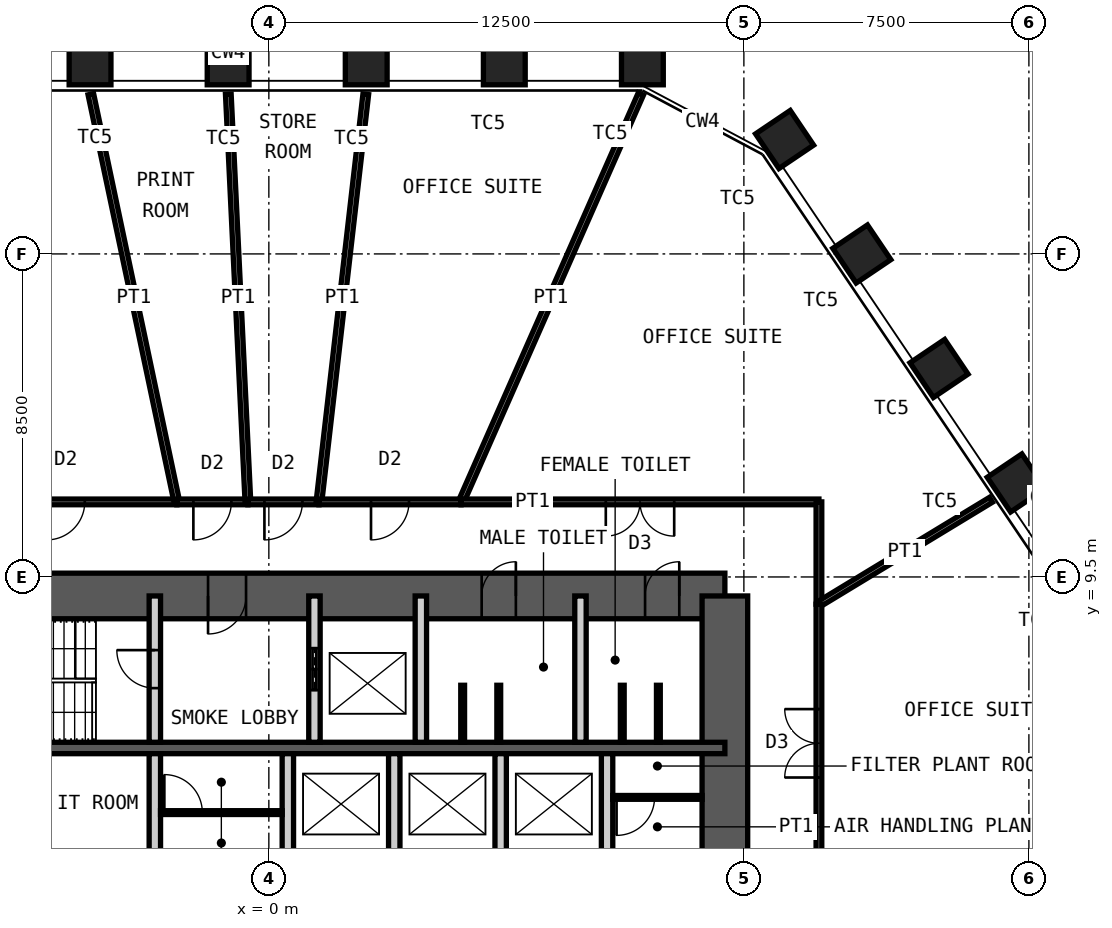
"""IFC4 building model, lengths in metres.
Left out: names, types, materials, properties, quantities, classifications, styles, units other than length and angle.
Written with IfcOpenShell. Run it as: python <this file> out.ifc"""

import sys

from ifc_helpers import new_model, si_unit, direction, frame, frame_2d, origin, origin_2d, place, context, subcontext, project, spatial, rectangle, hollow_rectangle, extrude, element, fill, save


model = new_model("IFC4")
c1 = context("Model", 3, precision=1e-05, world=origin(), true_north=direction((0.0, 1.0)))
c2 = subcontext(c1, "Body", "Model", "MODEL_VIEW")
j1 = project(units=[si_unit("LENGTHUNIT", "METRE"), si_unit("PLANEANGLEUNIT", "RADIAN")], contexts=[c1])
p1 = place(None, origin())
s1 = spatial("IfcSite", under=j1, at=p1, CompositionType="ELEMENT")
p2 = place(p1, origin())
s2 = spatial("IfcBuilding", under=s1, at=p2, CompositionType="ELEMENT")
p3 = place(p2, frame((0.0, 0.0, 201.4)))
s3 = spatial("IfcBuildingStorey", under=s2, at=p3, CompositionType="ELEMENT", Elevation=201.4)
for number, where, z_axis, x_axis in (
    (1, (-4.705, 23.0, 0.0), (0.0, 0.0, 1.0), (-1.0, 0.0, 0.0)),
    (2, (-1.071, 23.0, 0.0), (0.0, 0.0, 1.0), (-1.0, 0.0, 0.0)),
    (3, (2.562, 23.0, 0.0), (0.0, 0.0, 1.0), (-1.0, 0.0, 0.0)),
    (4, (6.196, 23.0, 0.0), (0.0, 0.0, 1.0), (-1.0, 0.0, 0.0)),
    (5, (9.829, 23.0, 0.0), (0.0, 0.0, 1.0), (-1.0, 0.0, 0.0)),
    (6, (13.571, 21.01, 0.0), (0.0, 0.0, 1.0), (-0.559, 0.829, 0.0)),
    (7, (15.603, 17.998, 0.0), (0.0, 0.0, 1.0), (-0.559, 0.829, 0.0)),
    (8, (17.635, 14.986, 0.0), (0.0, 0.0, 1.0), (-0.559, 0.829, 0.0)),
    (9, (19.667, 11.973, 0.0), (0.0, 0.0, 1.0), (-0.559, 0.829, 0.0)),
):
    element("IfcColumn", number, at=place(p3, frame(where, z_axis=z_axis, x_axis=x_axis)), inside=s3, PredefinedType="COLUMN", context=c2, shape_type="SweptSolid", body=[
        extrude(hollow_rectangle(XDim=1.1, YDim=1.1, WallThickness=0.07, at=origin_2d()), origin(), (0.0, 0.0, 1.0), 4.2),
    ])
p4 = place(p3, frame((-12.0, 9.0, 0.0), z_axis=(0.0, 0.0, 1.0), x_axis=(1.0, 0.0, 0.0)))
e10 = element("IfcWall", 10, at=p4, inside=s3, PredefinedType="SHEAR", context=c2, shape_type="SweptSolid", body=[
    extrude(rectangle(XDim=24.0, YDim=1.2, at=frame_2d((12.0, 0.0))), origin(), (0.0, 0.0, 1.0), 4.2),
])
p5 = place(p4, frame((10.4, 0.0, 0.0)))
e11 = element("IfcOpeningElement", 11, at=p5, cuts=e10, PredefinedType="OPENING", context=c2, shape_type="SweptSolid", body=[
    extrude(rectangle(XDim=1.0, YDim=2.1, at=frame_2d((0.5, 1.05))), frame((0.0, 0.61, 0.0), z_axis=(0.0, -1.0, 0.0), x_axis=(1.0, 0.0, 0.0)), (0.0, 0.0, 1.0), 1.22),
])
p6 = place(p4, frame((17.6, 0.0, 0.0)))
e12 = element("IfcOpeningElement", 12, at=p6, cuts=e10, PredefinedType="OPENING", context=c2, shape_type="SweptSolid", body=[
    extrude(rectangle(XDim=0.9, YDim=2.1, at=frame_2d((0.45, 1.05))), frame((0.0, 0.61, 0.0), z_axis=(0.0, -1.0, 0.0), x_axis=(1.0, 0.0, 0.0)), (0.0, 0.0, 1.0), 1.22),
])
p7 = place(p4, frame((21.9, 0.0, 0.0)))
e13 = element("IfcOpeningElement", 13, at=p7, cuts=e10, PredefinedType="OPENING", context=c2, shape_type="SweptSolid", body=[
    extrude(rectangle(XDim=0.9, YDim=2.1, at=frame_2d((0.45, 1.05))), frame((0.0, 0.61, 0.0), z_axis=(0.0, -1.0, 0.0), x_axis=(1.0, 0.0, 0.0)), (0.0, 0.0, 1.0), 1.22),
])
p8 = place(p3, frame((12.0, -9.0, 0.0), z_axis=(0.0, 0.0, 1.0), x_axis=(0.0, 1.0, 0.0)))
e14 = element("IfcWall", 14, at=p8, inside=s3, PredefinedType="SHEAR", context=c2, shape_type="SweptSolid", body=[
    extrude(rectangle(XDim=18.0, YDim=1.2, at=frame_2d((9.0, 0.0))), origin(), (0.0, 0.0, 1.0), 4.2),
])
p9 = place(p8, frame((8.1, 0.0, 0.0)))
e15 = element("IfcOpeningElement", 15, at=p9, cuts=e14, PredefinedType="OPENING", context=c2, shape_type="SweptSolid", body=[
    extrude(rectangle(XDim=1.8, YDim=2.1, at=frame_2d((0.9, 1.05))), frame((0.0, 0.61, 0.0), z_axis=(0.0, -1.0, 0.0), x_axis=(1.0, 0.0, 0.0)), (0.0, 0.0, 1.0), 1.22),
])
p10 = place(p3, frame((-12.0, 5.0, 0.0), z_axis=(0.0, 0.0, 1.0), x_axis=(1.0, 0.0, 0.0)))
e16 = element("IfcWall", 16, at=p10, inside=s3, PredefinedType="SHEAR", context=c2, shape_type="SweptSolid", body=[
    extrude(rectangle(XDim=24.0, YDim=0.3, at=frame_2d((12.0, 0.0))), origin(), (0.0, 0.0, 1.0), 4.2),
])
p11 = place(p3, frame((-3.0, 5.15, 0.0), z_axis=(0.0, 0.0, 1.0), x_axis=(0.0, 1.0, 0.0)))
e17 = element("IfcWall", 17, at=p11, inside=s3, PredefinedType="PARTITIONING", context=c2, shape_type="SweptSolid", body=[
    extrude(rectangle(XDim=3.85, YDim=0.3, at=frame_2d((1.925, 0.0))), origin(), (0.0, 0.0, 1.0), 3.98),
])
p12 = place(p11, frame((1.425, 0.0, 0.0)))
e18 = element("IfcOpeningElement", 18, at=p12, cuts=e17, PredefinedType="OPENING", context=c2, shape_type="SweptSolid", body=[
    extrude(rectangle(XDim=1.0, YDim=2.1, at=frame_2d((0.5, 1.05))), frame((0.0, 0.16, 0.0), z_axis=(0.0, -1.0, 0.0), x_axis=(1.0, 0.0, 0.0)), (0.0, 0.0, 1.0), 0.32),
])
p13 = place(p3, frame((1.2, 5.15, 0.0), z_axis=(0.0, 0.0, 1.0), x_axis=(0.0, 1.0, 0.0)))
e19 = element("IfcWall", 19, at=p13, inside=s3, PredefinedType="PARTITIONING", context=c2, shape_type="SweptSolid", body=[
    extrude(rectangle(XDim=3.85, YDim=0.3, at=frame_2d((1.925, 0.0))), origin(), (0.0, 0.0, 1.0), 3.98),
])
p14 = place(p13, frame((1.375, 0.0, 0.0)))
e20 = element("IfcOpeningElement", 20, at=p14, cuts=e19, PredefinedType="OPENING", context=c2, shape_type="SweptSolid", body=[
    extrude(rectangle(XDim=1.1, YDim=2.4, at=frame_2d((0.55, 1.2))), frame((0.0, 0.16, 0.0), z_axis=(0.0, -1.0, 0.0), x_axis=(1.0, 0.0, 0.0)), (0.0, 0.0, 1.0), 0.32),
])
for number, where, z_axis, x_axis in (
    (21, (4.0, 5.15, 0.0), (0.0, 0.0, 1.0), (0.0, 1.0, 0.0)),
    (22, (8.2, 5.15, 0.0), (0.0, 0.0, 1.0), (0.0, 1.0, 0.0)),
):
    element("IfcWall", number, at=place(p3, frame(where, z_axis=z_axis, x_axis=x_axis)), inside=s3, PredefinedType="PARTITIONING", context=c2, shape_type="SweptSolid", body=[
        extrude(rectangle(XDim=3.85, YDim=0.3, at=frame_2d((1.925, 0.0))), origin(), (0.0, 0.0, 1.0), 3.98),
    ])
for number, where, z_axis, x_axis in (
    (23, (-3.0, 2.2, 0.0), (0.0, 0.0, 1.0), (0.0, 1.0, 0.0)),
    (24, (0.5, 2.2, 0.0), (0.0, 0.0, 1.0), (0.0, 1.0, 0.0)),
    (25, (3.3, 2.2, 0.0), (0.0, 0.0, 1.0), (0.0, 1.0, 0.0)),
    (26, (6.1, 2.2, 0.0), (0.0, 0.0, 1.0), (0.0, 1.0, 0.0)),
    (27, (8.9, 2.2, 0.0), (0.0, 0.0, 1.0), (0.0, 1.0, 0.0)),
):
    element("IfcWall", number, at=place(p3, frame(where, z_axis=z_axis, x_axis=x_axis)), inside=s3, PredefinedType="PARTITIONING", context=c2, shape_type="SweptSolid", body=[
        extrude(rectangle(XDim=2.65, YDim=0.3, at=frame_2d((1.325, 0.0))), origin(), (0.0, 0.0, 1.0), 3.98),
    ])
p15 = place(p3, frame((-2.85, 3.3, 0.0), z_axis=(0.0, 0.0, 1.0), x_axis=(1.0, 0.0, 0.0)))
e28 = element("IfcWall", 28, at=p15, inside=s3, PredefinedType="PARTITIONING", context=c2, shape_type="SweptSolid", body=[
    extrude(rectangle(XDim=3.2, YDim=0.1, at=frame_2d((1.6, 0.0))), origin(), (0.0, 0.0, 1.0), 3.98),
])
p16 = place(p15, frame((0.1, 0.0, 0.0)))
e29 = element("IfcOpeningElement", 29, at=p16, cuts=e28, PredefinedType="OPENING", context=c2, shape_type="SweptSolid", body=[
    extrude(rectangle(XDim=1.0, YDim=2.4, at=frame_2d((0.5, 1.2))), frame((0.0, 0.06, 0.0), z_axis=(0.0, -1.0, 0.0), x_axis=(1.0, 0.0, 0.0)), (0.0, 0.0, 1.0), 0.12),
])
p17 = place(p3, frame((9.05, 3.7, 0.0), z_axis=(0.0, 0.0, 1.0), x_axis=(1.0, 0.0, 0.0)))
e30 = element("IfcWall", 30, at=p17, inside=s3, PredefinedType="PARTITIONING", context=c2, shape_type="SweptSolid", body=[
    extrude(rectangle(XDim=2.35, YDim=0.1, at=frame_2d((1.175, 0.0))), origin(), (0.0, 0.0, 1.0), 3.98),
])
p18 = place(p17, frame((0.1, 0.0, 0.0)))
e31 = element("IfcOpeningElement", 31, at=p18, cuts=e30, PredefinedType="OPENING", context=c2, shape_type="SweptSolid", body=[
    extrude(rectangle(XDim=1.0, YDim=2.4, at=frame_2d((0.5, 1.2))), frame((0.0, 0.06, 0.0), z_axis=(0.0, -1.0, 0.0), x_axis=(1.0, 0.0, 0.0)), (0.0, 0.0, 1.0), 0.12),
])
for number, where, z_axis, x_axis in (
    (32, (5.1, 5.15, 0.0), (0.0, 0.0, 1.0), (0.0, 1.0, 0.0)),
    (33, (6.05, 5.15, 0.0), (0.0, 0.0, 1.0), (0.0, 1.0, 0.0)),
    (34, (9.3, 5.15, 0.0), (0.0, 0.0, 1.0), (0.0, 1.0, 0.0)),
    (35, (10.25, 5.15, 0.0), (0.0, 0.0, 1.0), (0.0, 1.0, 0.0)),
):
    element("IfcWall", number, at=place(p3, frame(where, z_axis=z_axis, x_axis=x_axis)), inside=s3, PredefinedType="PARTITIONING", context=c2, shape_type="SweptSolid", body=[
        extrude(rectangle(XDim=1.5, YDim=0.1, at=frame_2d((0.75, 0.0))), origin(), (0.0, 0.0, 1.0), 2.1),
    ])
p19 = place(p3, frame((9.789, 22.208, 0.0), z_axis=(0.0, 0.0, 1.0), x_axis=(-0.403346052835, -0.9150475188, 0.0)))
e36 = element("IfcWall", 36, at=p19, inside=s3, PredefinedType="PARTITIONING", context=c2, shape_type="SweptSolid", body=[
    extrude(rectangle(XDim=11.73, YDim=0.15, at=frame_2d((5.865, 0.0))), origin(), (0.0, 0.0, 1.0), 2.93),
])
p20 = place(p3, frame((5.058, 11.475, 0.0), z_axis=(0.0, 0.0, 1.0), x_axis=(1.0, 0.0, 0.0)))
e37 = element("IfcWall", 37, at=p20, inside=s3, PredefinedType="PARTITIONING", context=c2, shape_type="SweptSolid", body=[
    extrude(rectangle(XDim=9.417, YDim=0.15, at=frame_2d((4.708, 0.0))), origin(), (0.0, 0.0, 1.0), 4.03),
])
p21 = place(p20, frame((3.809, 0.0, 0.0)))
e38 = element("IfcOpeningElement", 38, at=p21, cuts=e37, PredefinedType="OPENING", context=c2, shape_type="SweptSolid", body=[
    extrude(rectangle(XDim=1.8, YDim=2.4, at=frame_2d((0.9, 1.2))), frame((0.0, 0.085, 0.0), z_axis=(0.0, -1.0, 0.0), x_axis=(1.0, 0.0, 0.0)), (0.0, 0.0, 1.0), 0.17),
])
p22 = place(p3, frame((14.475, 11.475, 0.0), z_axis=(0.0, 0.0, 1.0), x_axis=(0.0, -1.0, 0.0)))
e39 = element("IfcWall", 39, at=p22, inside=s3, PredefinedType="PARTITIONING", context=c2, shape_type="SweptSolid", body=[
    extrude(rectangle(XDim=2.692, YDim=0.15, at=frame_2d((1.346, 0.0))), origin(), (0.0, 0.0, 1.0), 4.03),
])
p23 = place(p3, frame((19.001, 11.53, 0.0), z_axis=(0.0, 0.0, 1.0), x_axis=(-0.854906581035, -0.518781975114, 0.0)))
e40 = element("IfcWall", 40, at=p23, inside=s3, PredefinedType="PARTITIONING", context=c2, shape_type="SweptSolid", body=[
    extrude(rectangle(XDim=5.294, YDim=0.15, at=frame_2d((2.647, 0.0))), origin(), (0.0, 0.0, 1.0), 3.43),
])
p24 = place(p3, frame((14.475, 8.783, 0.0), z_axis=(0.0, 0.0, 1.0), x_axis=(0.0, -1.0, 0.0)))
e41 = element("IfcWall", 41, at=p24, inside=s3, PredefinedType="PARTITIONING", context=c2, shape_type="SweptSolid", body=[
    extrude(rectangle(XDim=7.321, YDim=0.15, at=frame_2d((3.66, 0.0))), origin(), (0.0, 0.0, 1.0), 4.03),
])
p25 = place(p24, frame((2.76, 0.0, 0.0)))
e42 = element("IfcOpeningElement", 42, at=p25, cuts=e41, PredefinedType="OPENING", context=c2, shape_type="SweptSolid", body=[
    extrude(rectangle(XDim=1.8, YDim=2.4, at=frame_2d((0.9, 1.2))), frame((0.0, 0.085, 0.0), z_axis=(0.0, -1.0, 0.0), x_axis=(1.0, 0.0, 0.0)), (0.0, 0.0, 1.0), 0.17),
])
p26 = place(p3, frame((25.083, 2.535, 0.0), z_axis=(0.0, 0.0, 1.0), x_axis=(-0.994932122767, -0.10054884925, 0.0)))
e43 = element("IfcWall", 43, at=p26, inside=s3, PredefinedType="PARTITIONING", context=c2, shape_type="SweptSolid", body=[
    extrude(rectangle(XDim=10.662, YDim=0.15, at=frame_2d((5.331, 0.0))), origin(), (0.0, 0.0, 1.0), 2.93),
])
p27 = place(p3, frame((-8.267, 11.475, 0.0), z_axis=(0.0, 0.0, 1.0), x_axis=(1.0, 0.0, 0.0)))
e44 = element("IfcWall", 44, at=p27, inside=s3, PredefinedType="PARTITIONING", context=c2, shape_type="SweptSolid", body=[
    extrude(rectangle(XDim=5.846, YDim=0.15, at=frame_2d((2.923, 0.0))), origin(), (0.0, 0.0, 1.0), 4.03),
])
p28 = place(p27, frame((2.423, 0.0, 0.0)))
e45 = element("IfcOpeningElement", 45, at=p28, cuts=e44, PredefinedType="OPENING", context=c2, shape_type="SweptSolid", body=[
    extrude(rectangle(XDim=1.0, YDim=2.4, at=frame_2d((0.5, 1.2))), frame((0.0, 0.085, 0.0), z_axis=(0.0, -1.0, 0.0), x_axis=(1.0, 0.0, 0.0)), (0.0, 0.0, 1.0), 0.17),
])
p29 = place(p3, frame((-4.684, 22.202, 0.0), z_axis=(0.0, 0.0, 1.0), x_axis=(0.206456017157, -0.978455881979, 0.0)))
e46 = element("IfcWall", 46, at=p29, inside=s3, PredefinedType="PARTITIONING", context=c2, shape_type="SweptSolid", body=[
    extrude(rectangle(XDim=10.963, YDim=0.15, at=frame_2d((5.481, 0.0))), origin(), (0.0, 0.0, 1.0), 3.43),
])
p30 = place(p3, frame((-2.421, 11.475, 0.0), z_axis=(0.0, 0.0, 1.0), x_axis=(1.0, 0.0, 0.0)))
e47 = element("IfcWall", 47, at=p30, inside=s3, PredefinedType="PARTITIONING", context=c2, shape_type="SweptSolid", body=[
    extrude(rectangle(XDim=1.87, YDim=0.15, at=frame_2d((0.935, 0.0))), origin(), (0.0, 0.0, 1.0), 4.03),
])
p31 = place(p30, frame((0.435, 0.0, 0.0)))
e48 = element("IfcOpeningElement", 48, at=p31, cuts=e47, PredefinedType="OPENING", context=c2, shape_type="SweptSolid", body=[
    extrude(rectangle(XDim=1.0, YDim=2.4, at=frame_2d((0.5, 1.2))), frame((0.0, 0.085, 0.0), z_axis=(0.0, -1.0, 0.0), x_axis=(1.0, 0.0, 0.0)), (0.0, 0.0, 1.0), 0.17),
])
p32 = place(p3, frame((-1.067, 22.2, 0.0), z_axis=(0.0, 0.0, 1.0), x_axis=(0.047998335863, -0.998847415652, 0.0)))
e49 = element("IfcWall", 49, at=p32, inside=s3, PredefinedType="PARTITIONING", context=c2, shape_type="SweptSolid", body=[
    extrude(rectangle(XDim=10.738, YDim=0.15, at=frame_2d((5.369, 0.0))), origin(), (0.0, 0.0, 1.0), 3.43),
])
p33 = place(p3, frame((-0.551, 11.475, 0.0), z_axis=(0.0, 0.0, 1.0), x_axis=(1.0, 0.0, 0.0)))
e50 = element("IfcWall", 50, at=p33, inside=s3, PredefinedType="PARTITIONING", context=c2, shape_type="SweptSolid", body=[
    extrude(rectangle(XDim=1.87, YDim=0.15, at=frame_2d((0.935, 0.0))), origin(), (0.0, 0.0, 1.0), 4.03),
])
p34 = place(p33, frame((0.435, 0.0, 0.0)))
e51 = element("IfcOpeningElement", 51, at=p34, cuts=e50, PredefinedType="OPENING", context=c2, shape_type="SweptSolid", body=[
    extrude(rectangle(XDim=1.0, YDim=2.4, at=frame_2d((0.5, 1.2))), frame((0.0, 0.085, 0.0), z_axis=(0.0, -1.0, 0.0), x_axis=(1.0, 0.0, 0.0)), (0.0, 0.0, 1.0), 0.17),
])
p35 = place(p3, frame((2.551, 22.201, 0.0), z_axis=(0.0, 0.0, 1.0), x_axis=(-0.11415373111, -0.993463097288, 0.0)))
e52 = element("IfcWall", 52, at=p35, inside=s3, PredefinedType="PARTITIONING", context=c2, shape_type="SweptSolid", body=[
    extrude(rectangle(XDim=10.796, YDim=0.15, at=frame_2d((5.398, 0.0))), origin(), (0.0, 0.0, 1.0), 3.43),
])
p36 = place(p3, frame((1.318, 11.475, 0.0), z_axis=(0.0, 0.0, 1.0), x_axis=(1.0, 0.0, 0.0)))
e53 = element("IfcWall", 53, at=p36, inside=s3, PredefinedType="PARTITIONING", context=c2, shape_type="SweptSolid", body=[
    extrude(rectangle(XDim=3.74, YDim=0.15, at=frame_2d((1.87, 0.0))), origin(), (0.0, 0.0, 1.0), 4.03),
])
p37 = place(p36, frame((1.37, 0.0, 0.0)))
e54 = element("IfcOpeningElement", 54, at=p37, cuts=e53, PredefinedType="OPENING", context=c2, shape_type="SweptSolid", body=[
    extrude(rectangle(XDim=1.0, YDim=2.4, at=frame_2d((0.5, 1.2))), frame((0.0, 0.085, 0.0), z_axis=(0.0, -1.0, 0.0), x_axis=(1.0, 0.0, 0.0)), (0.0, 0.0, 1.0), 0.17),
])
p38 = place(p5, origin())
e55 = element("IfcDoor", 55, at=p38, inside=s3, OperationType="SINGLE_SWING_LEFT", PredefinedType="DOOR", context=c2, shape_type="SweptSolid", body=[
    extrude(rectangle(XDim=1.0, YDim=2.1, at=frame_2d((0.5, 1.05))), frame((0.0, 0.025, 0.0), z_axis=(0.0, -1.0, 0.0), x_axis=(1.0, 0.0, 0.0)), (0.0, 0.0, 1.0), 0.05),
])
fill(e11, e55)
p39 = place(p6, origin())
e56 = element("IfcDoor", 56, at=p39, inside=s3, OperationType="SINGLE_SWING_LEFT", PredefinedType="DOOR", context=c2, shape_type="SweptSolid", body=[
    extrude(rectangle(XDim=0.9, YDim=2.1, at=frame_2d((0.45, 1.05))), frame((0.0, 0.025, 0.0), z_axis=(0.0, -1.0, 0.0), x_axis=(1.0, 0.0, 0.0)), (0.0, 0.0, 1.0), 0.05),
])
fill(e12, e56)
p40 = place(p7, origin())
e57 = element("IfcDoor", 57, at=p40, inside=s3, OperationType="SINGLE_SWING_LEFT", PredefinedType="DOOR", context=c2, shape_type="SweptSolid", body=[
    extrude(rectangle(XDim=0.9, YDim=2.1, at=frame_2d((0.45, 1.05))), frame((0.0, 0.025, 0.0), z_axis=(0.0, -1.0, 0.0), x_axis=(1.0, 0.0, 0.0)), (0.0, 0.0, 1.0), 0.05),
])
fill(e13, e57)
p41 = place(p12, origin())
e58 = element("IfcDoor", 58, at=p41, inside=s3, OperationType="SINGLE_SWING_LEFT", PredefinedType="DOOR", context=c2, shape_type="SweptSolid", body=[
    extrude(rectangle(XDim=1.0, YDim=2.1, at=frame_2d((0.5, 1.05))), frame((0.0, 0.025, 0.0), z_axis=(0.0, -1.0, 0.0), x_axis=(1.0, 0.0, 0.0)), (0.0, 0.0, 1.0), 0.05),
])
fill(e18, e58)
p42 = place(p14, origin())
e59 = element("IfcDoor", 59, at=p42, inside=s3, OperationType="DOUBLE_DOOR_SLIDING", PredefinedType="DOOR", context=c2, shape_type="SweptSolid", body=[
    extrude(rectangle(XDim=1.1, YDim=2.4, at=frame_2d((0.55, 1.2))), frame((0.0, 0.025, 0.0), z_axis=(0.0, -1.0, 0.0), x_axis=(1.0, 0.0, 0.0)), (0.0, 0.0, 1.0), 0.05),
])
fill(e20, e59)
p43 = place(p16, origin())
e60 = element("IfcDoor", 60, at=p43, inside=s3, OperationType="SINGLE_SWING_RIGHT", PredefinedType="DOOR", context=c2, shape_type="SweptSolid", body=[
    extrude(rectangle(XDim=1.0, YDim=2.4, at=frame_2d((0.5, 1.2))), frame((0.0, 0.025, 0.0), z_axis=(0.0, -1.0, 0.0), x_axis=(1.0, 0.0, 0.0)), (0.0, 0.0, 1.0), 0.05),
])
fill(e29, e60)
p44 = place(p18, origin())
e61 = element("IfcDoor", 61, at=p44, inside=s3, OperationType="SINGLE_SWING_LEFT", PredefinedType="DOOR", context=c2, shape_type="SweptSolid", body=[
    extrude(rectangle(XDim=1.0, YDim=2.4, at=frame_2d((0.5, 1.2))), frame((0.0, 0.025, 0.0), z_axis=(0.0, -1.0, 0.0), x_axis=(1.0, 0.0, 0.0)), (0.0, 0.0, 1.0), 0.05),
])
fill(e31, e61)
p45 = place(p21, origin())
e62 = element("IfcDoor", 62, at=p45, inside=s3, OperationType="DOUBLE_DOOR_DOUBLE_SWING", PredefinedType="DOOR", context=c2, shape_type="SweptSolid", body=[
    extrude(rectangle(XDim=1.8, YDim=2.4, at=frame_2d((0.9, 1.2))), frame((0.0, 0.025, 0.0), z_axis=(0.0, -1.0, 0.0), x_axis=(1.0, 0.0, 0.0)), (0.0, 0.0, 1.0), 0.05),
])
fill(e38, e62)
p46 = place(p25, origin())
e63 = element("IfcDoor", 63, at=p46, inside=s3, OperationType="DOUBLE_DOOR_DOUBLE_SWING", PredefinedType="DOOR", context=c2, shape_type="SweptSolid", body=[
    extrude(rectangle(XDim=1.8, YDim=2.4, at=frame_2d((0.9, 1.2))), frame((0.0, 0.025, 0.0), z_axis=(0.0, -1.0, 0.0), x_axis=(1.0, 0.0, 0.0)), (0.0, 0.0, 1.0), 0.05),
])
fill(e42, e63)
p47 = place(p28, origin())
e64 = element("IfcDoor", 64, at=p47, inside=s3, OperationType="SINGLE_SWING_LEFT", PredefinedType="DOOR", context=c2, shape_type="SweptSolid", body=[
    extrude(rectangle(XDim=1.0, YDim=2.4, at=frame_2d((0.5, 1.2))), frame((0.0, 0.025, 0.0), z_axis=(0.0, -1.0, 0.0), x_axis=(1.0, 0.0, 0.0)), (0.0, 0.0, 1.0), 0.05),
])
fill(e45, e64)
p48 = place(p31, origin())
e65 = element("IfcDoor", 65, at=p48, inside=s3, OperationType="SINGLE_SWING_LEFT", PredefinedType="DOOR", context=c2, shape_type="SweptSolid", body=[
    extrude(rectangle(XDim=1.0, YDim=2.4, at=frame_2d((0.5, 1.2))), frame((0.0, 0.025, 0.0), z_axis=(0.0, -1.0, 0.0), x_axis=(1.0, 0.0, 0.0)), (0.0, 0.0, 1.0), 0.05),
])
fill(e48, e65)
p49 = place(p34, origin())
e66 = element("IfcDoor", 66, at=p49, inside=s3, OperationType="SINGLE_SWING_LEFT", PredefinedType="DOOR", context=c2, shape_type="SweptSolid", body=[
    extrude(rectangle(XDim=1.0, YDim=2.4, at=frame_2d((0.5, 1.2))), frame((0.0, 0.025, 0.0), z_axis=(0.0, -1.0, 0.0), x_axis=(1.0, 0.0, 0.0)), (0.0, 0.0, 1.0), 0.05),
])
fill(e51, e66)
p50 = place(p37, origin())
e67 = element("IfcDoor", 67, at=p50, inside=s3, OperationType="SINGLE_SWING_LEFT", PredefinedType="DOOR", context=c2, shape_type="SweptSolid", body=[
    extrude(rectangle(XDim=1.0, YDim=2.4, at=frame_2d((0.5, 1.2))), frame((0.0, 0.025, 0.0), z_axis=(0.0, -1.0, 0.0), x_axis=(1.0, 0.0, 0.0)), (0.0, 0.0, 1.0), 0.05),
])
fill(e54, e67)
save(model, sys.argv[1])
